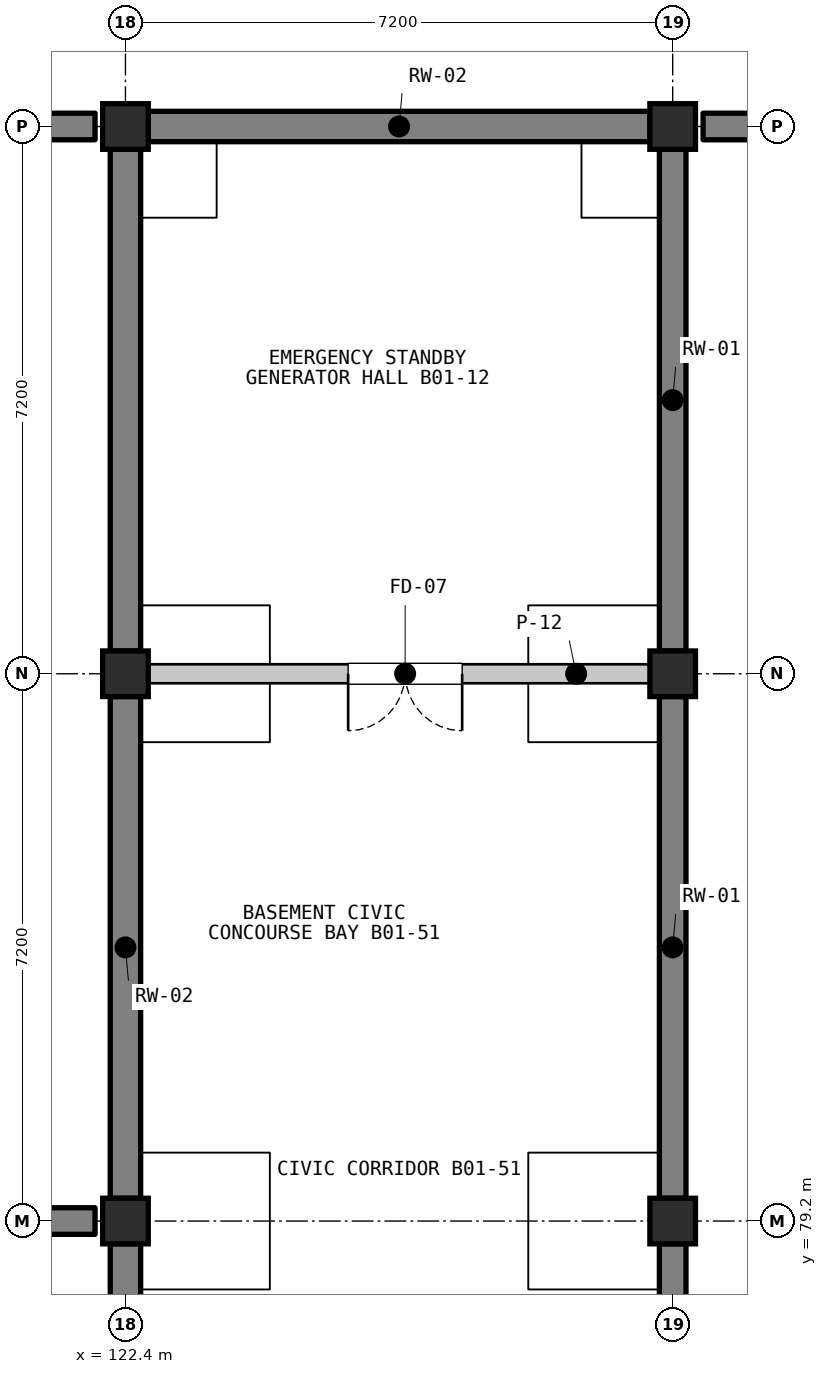
"""IFC4 building model, lengths in metres.
Left out: names, types, materials, properties, quantities, classifications, styles, units other than length and angle.
Written with IfcOpenShell. Run it as: python <this file> out.ifc"""

import sys

from ifc_helpers import new_model, si_unit, direction, frame, frame_2d, origin, origin_2d, place, context, subcontext, project, spatial, rectangle, extrude, element, fill, save


model = new_model("IFC4")
c1 = context("Model", 3, precision=1e-05, world=origin(), true_north=direction((0.0, 1.0)))
c2 = subcontext(c1, "Body", "Model", "MODEL_VIEW")
j1 = project(units=[si_unit("LENGTHUNIT", "METRE"), si_unit("PLANEANGLEUNIT", "RADIAN")], contexts=[c1])
p1 = place(None, origin())
s1 = spatial("IfcSite", under=j1, at=p1, CompositionType="ELEMENT")
p2 = place(p1, origin())
s2 = spatial("IfcBuilding", under=s1, at=p2, CompositionType="ELEMENT")
p3 = place(p2, frame((0.0, 0.0, -4.2)))
s3 = spatial("IfcBuildingStorey", under=s2, at=p3, CompositionType="ELEMENT", Elevation=-4.2)
p4 = place(p3, frame((122.4, 72.3, 0.0), z_axis=(0.0, 0.0, 1.0), x_axis=(0.0, 1.0, 0.0)))
e1 = element("IfcWall", 1, at=p4, inside=s3, PredefinedType="USERDEFINED", context=c2, shape_type="SweptSolid", body=[
    extrude(rectangle(XDim=6.6, YDim=0.4, at=frame_2d((3.3, 0.0))), origin(), (0.0, 0.0, 1.0), 3.98),
])
p5 = place(p3, frame((129.6, 72.3, 0.0), z_axis=(0.0, 0.0, 1.0), x_axis=(0.0, 1.0, 0.0)))
e2 = element("IfcWall", 2, at=p5, inside=s3, PredefinedType="USERDEFINED", context=c2, shape_type="SweptSolid", body=[
    extrude(rectangle(XDim=6.6, YDim=0.35, at=frame_2d((3.3, 0.0))), origin(), (0.0, 0.0, 1.0), 3.98),
])
p6 = place(p3, frame((122.4, 79.5, 0.0), z_axis=(0.0, 0.0, 1.0), x_axis=(0.0, 1.0, 0.0)))
e3 = element("IfcWall", 3, at=p6, inside=s3, PredefinedType="USERDEFINED", context=c2, shape_type="SweptSolid", body=[
    extrude(rectangle(XDim=6.6, YDim=0.4, at=frame_2d((3.3, 0.0))), origin(), (0.0, 0.0, 1.0), 3.98),
])
p7 = place(p3, frame((129.6, 79.5, 0.0), z_axis=(0.0, 0.0, 1.0), x_axis=(0.0, 1.0, 0.0)))
e4 = element("IfcWall", 4, at=p7, inside=s3, PredefinedType="USERDEFINED", context=c2, shape_type="SweptSolid", body=[
    extrude(rectangle(XDim=6.6, YDim=0.35, at=frame_2d((3.3, 0.0))), origin(), (0.0, 0.0, 1.0), 3.98),
])
for number, where, z_axis, x_axis in (
    (5, (122.7, 93.6, 0.0), (0.0, 0.0, 1.0), (1.0, 0.0, 0.0)),
    (6, (122.4, 86.7, 0.0), (0.0, 0.0, 1.0), (0.0, 1.0, 0.0)),
):
    element("IfcWall", number, at=place(p3, frame(where, z_axis=z_axis, x_axis=x_axis)), inside=s3, PredefinedType="USERDEFINED", context=c2, shape_type="SweptSolid", body=[
        extrude(rectangle(XDim=6.6, YDim=0.4, at=frame_2d((3.3, 0.0))), origin(), (0.0, 0.0, 1.0), 3.98),
    ])
p8 = place(p3, frame((129.6, 86.7, 0.0), z_axis=(0.0, 0.0, 1.0), x_axis=(0.0, 1.0, 0.0)))
e7 = element("IfcWall", 7, at=p8, inside=s3, PredefinedType="USERDEFINED", context=c2, shape_type="SweptSolid", body=[
    extrude(rectangle(XDim=6.6, YDim=0.35, at=frame_2d((3.3, 0.0))), origin(), (0.0, 0.0, 1.0), 3.98),
])
for number, where, z_axis, x_axis in (
    (8, (115.6, 79.2, 0.0), (0.0, 0.0, 1.0), (1.0, 0.0, 0.0)),
    (9, (115.6, 93.6, 0.0), (0.0, 0.0, 1.0), (1.0, 0.0, 0.0)),
    (10, (130.0, 93.6, 0.0), (0.0, 0.0, 1.0), (1.0, 0.0, 0.0)),
):
    element("IfcWall", number, at=place(p3, frame(where, z_axis=z_axis, x_axis=x_axis)), inside=s3, PredefinedType="USERDEFINED", context=c2, shape_type="SweptSolid", body=[
        extrude(rectangle(XDim=6.4, YDim=0.35, at=frame_2d((3.2, 0.0))), origin(), (0.0, 0.0, 1.0), 3.98),
    ])
for number, where, z_axis, x_axis in (
    (11, (122.4, 79.2, 0.0), (0.0, 0.0, 1.0), (1.0, 0.0, 0.0)),
    (12, (122.4, 86.4, 0.0), (0.0, 0.0, 1.0), (1.0, 0.0, 0.0)),
    (13, (122.4, 93.6, 0.0), (0.0, 0.0, 1.0), (1.0, 0.0, 0.0)),
    (14, (129.6, 79.2, 0.0), (0.0, 0.0, 1.0), (1.0, 0.0, 0.0)),
    (15, (129.6, 86.4, 0.0), (0.0, 0.0, 1.0), (1.0, 0.0, 0.0)),
    (16, (129.6, 93.6, 0.0), (0.0, 0.0, 1.0), (1.0, 0.0, 0.0)),
):
    element("IfcColumn", number, at=place(p3, frame(where, z_axis=z_axis, x_axis=x_axis)), inside=s3, PredefinedType="COLUMN", context=c2, shape_type="SweptSolid", body=[
        extrude(rectangle(XDim=0.6, YDim=0.6, at=origin_2d()), origin(), (0.0, 0.0, 1.0), 4.2),
    ])
p9 = place(p3, frame((129.48, 86.4, 0.0), z_axis=(0.0, 0.0, 1.0), x_axis=(-1.0, 0.0, 0.0)))
e17 = element("IfcWall", 17, at=p9, inside=s3, PredefinedType="PARTITIONING", context=c2, shape_type="SweptSolid", body=[
    extrude(rectangle(XDim=6.8, YDim=0.25, at=frame_2d((3.4, 0.0))), origin(), (0.0, 0.0, 1.0), 3.208),
])
p10 = place(p9, frame((2.65, 0.0, 0.0)))
e18 = element("IfcOpeningElement", 18, at=p10, cuts=e17, PredefinedType="OPENING", context=c2, shape_type="SweptSolid", body=[
    extrude(rectangle(XDim=1.5, YDim=2.25, at=frame_2d((0.75, 1.125))), frame((0.0, 0.135, 0.0), z_axis=(0.0, -1.0, 0.0), x_axis=(1.0, 0.0, 0.0)), (0.0, 0.0, 1.0), 0.27),
])
p11 = place(p10, origin())
e19 = element("IfcDoor", 19, at=p11, inside=s3, OperationType="DOUBLE_DOOR_SINGLE_SWING", PredefinedType="DOOR", context=c2, shape_type="SweptSolid", body=[
    extrude(rectangle(XDim=1.5, YDim=2.25, at=frame_2d((0.75, 1.125))), frame((0.0, 0.025, 0.0), z_axis=(0.0, -1.0, 0.0), x_axis=(1.0, 0.0, 0.0)), (0.0, 0.0, 1.0), 0.05),
])
fill(e18, e19)
save(model, sys.argv[1])
